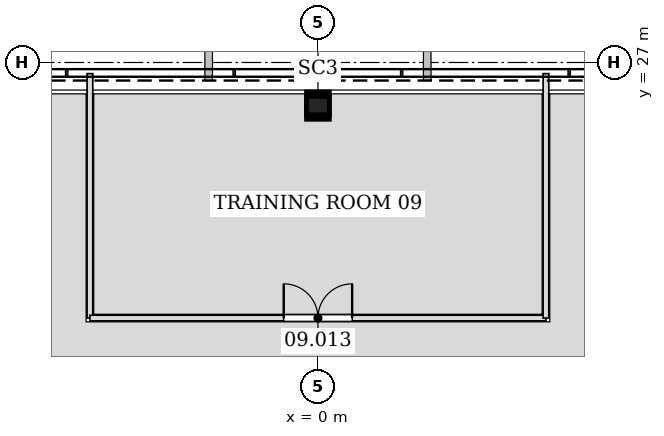
"""IFC4 building model, lengths in metres.
Left out: names, types, materials, properties, quantities, classifications, styles, units other than length and angle.
Written with IfcOpenShell. Run it as: python <this file> out.ifc"""

import sys

from ifc_helpers import new_model, si_unit, direction, frame, frame_2d, origin, origin_2d, place, context, subcontext, project, spatial, rectangle, hollow_rectangle, extrude, element, fill, save


model = new_model("IFC4")
c1 = context("Model", 3, precision=1e-05, world=origin(), true_north=direction((0.0, 1.0)))
c2 = subcontext(c1, "Body", "Model", "MODEL_VIEW")
j1 = project(units=[si_unit("LENGTHUNIT", "METRE"), si_unit("PLANEANGLEUNIT", "RADIAN")], contexts=[c1])
p1 = place(None, origin())
s1 = spatial("IfcSite", under=j1, at=p1, CompositionType="ELEMENT")
p2 = place(p1, origin())
s2 = spatial("IfcBuilding", under=s1, at=p2, CompositionType="ELEMENT")
p3 = place(p2, frame((0.0, 0.0, 45.6)))
s3 = spatial("IfcBuildingStorey", under=s2, at=p3, CompositionType="ELEMENT", Elevation=45.6)
p4 = place(p3, frame((0.0, 25.925, 0.0), z_axis=(0.0, -0.028297679255, 0.99959954049), x_axis=(1.0, 0.0, 0.0)))
e1 = element("IfcColumn", 1, at=p4, inside=s3, PredefinedType="COLUMN", context=c2, shape_type="SweptSolid", body=[
    extrude(hollow_rectangle(XDim=0.6, YDim=0.6, WallThickness=0.032, at=origin_2d()), origin(), (0.0, 0.0, 1.0), 4.202),
])
p5 = place(p3, frame((-6.0, 26.707, 0.0), z_axis=(0.0, 0.0, 1.0), x_axis=(0.0, -1.0, 0.0)))
e2 = element("IfcWall", 2, at=p5, inside=s3, PredefinedType="PARTITIONING", context=c2, shape_type="SweptSolid", body=[
    extrude(rectangle(XDim=6.432, YDim=0.15, at=frame_2d((3.216, 0.0))), origin(), (0.0, 0.0, 1.0), 3.423),
])
p6 = place(p3, frame((-6.0, 20.275, 0.0), z_axis=(0.0, 0.0, 1.0), x_axis=(1.0, 0.0, 0.0)))
e3 = element("IfcWall", 3, at=p6, inside=s3, PredefinedType="PARTITIONING", context=c2, shape_type="SweptSolid", body=[
    extrude(rectangle(XDim=12.0, YDim=0.15, at=frame_2d((6.0, 0.0))), origin(), (0.0, 0.0, 1.0), 2.983),
])
p7 = place(p6, frame((5.1, 0.0, 0.0)))
e4 = element("IfcOpeningElement", 4, at=p7, cuts=e3, PredefinedType="OPENING", context=c2, shape_type="SweptSolid", body=[
    extrude(rectangle(XDim=1.8, YDim=2.4, at=frame_2d((0.9, 1.2))), frame((0.0, 0.085, 0.0), z_axis=(0.0, -1.0, 0.0), x_axis=(1.0, 0.0, 0.0)), (0.0, 0.0, 1.0), 0.17),
])
p8 = place(p3, frame((6.0, 20.275, 0.0), z_axis=(0.0, 0.0, 1.0), x_axis=(0.0, 1.0, 0.0)))
e5 = element("IfcWall", 5, at=p8, inside=s3, PredefinedType="PARTITIONING", context=c2, shape_type="SweptSolid", body=[
    extrude(rectangle(XDim=6.432, YDim=0.15, at=frame_2d((3.216, 0.0))), origin(), (0.0, 0.0, 1.0), 3.423),
])
p9 = place(p7, origin())
e6 = element("IfcDoor", 6, at=p9, inside=s3, OperationType="DOUBLE_DOOR_SINGLE_SWING", PredefinedType="DOOR", context=c2, shape_type="SweptSolid", body=[
    extrude(rectangle(XDim=1.8, YDim=2.4, at=frame_2d((0.9, 1.2))), frame((0.0, 0.025, 0.0), z_axis=(0.0, -1.0, 0.0), x_axis=(1.0, 0.0, 0.0)), (0.0, 0.0, 1.0), 0.05),
])
fill(e4, e6)
save(model, sys.argv[1])
